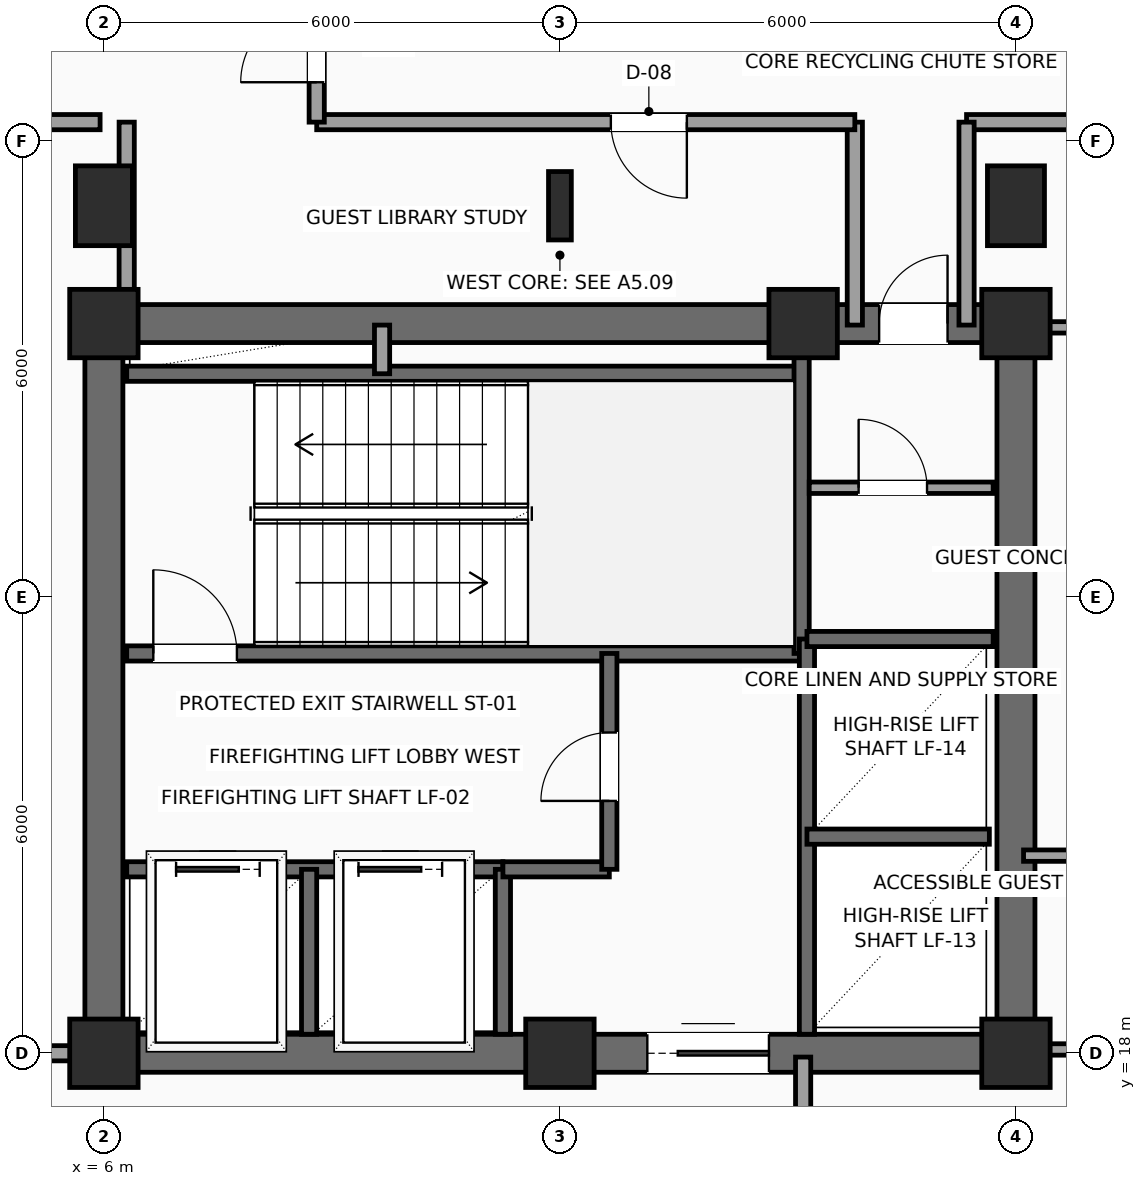
"""IFC4 building model, lengths in metres.
Left out: names, types, materials, properties, quantities, classifications, styles, units other than length and angle.
Written with IfcOpenShell. Run it as: python <this file> out.ifc"""

import sys

from ifc_helpers import new_model, si_unit, direction, frame, frame_2d, origin, origin_2d, place, context, subcontext, project, spatial, rectangle, i_section, extrude, element, fill, save


model = new_model("IFC4")
c1 = context("Model", 3, precision=1e-05, world=origin(), true_north=direction((0.0, 1.0)))
c2 = subcontext(c1, "Body", "Model", "MODEL_VIEW")
j1 = project(units=[si_unit("LENGTHUNIT", "METRE"), si_unit("PLANEANGLEUNIT", "RADIAN")], contexts=[c1])
p1 = place(None, origin())
s1 = spatial("IfcSite", under=j1, at=p1, CompositionType="ELEMENT")
p2 = place(p1, origin())
s2 = spatial("IfcBuilding", under=s1, at=p2, CompositionType="ELEMENT")
p3 = place(p2, frame((0.0, 0.0, 172.95)))
s3 = spatial("IfcBuildingStorey", under=s2, at=p3, CompositionType="ELEMENT", Elevation=172.95)
for number, where, z_axis, x_axis in (
    (1, (6.0, 18.0, 0.0), (0.0, 0.0, 1.0), (1.0, 0.0, 0.0)),
    (2, (12.0, 18.0, 0.0), (0.0, 0.0, 1.0), (1.0, 0.0, 0.0)),
    (3, (18.0, 18.0, 0.0), (0.0, 0.0, 1.0), (1.0, 0.0, 0.0)),
    (4, (6.0, 27.6, 0.0), (0.0, 0.0, 1.0), (1.0, 0.0, 0.0)),
    (5, (15.2, 27.6, 0.0), (0.0, 0.0, 1.0), (1.0, 0.0, 0.0)),
    (6, (18.0, 27.6, 0.0), (0.0, 0.0, 1.0), (1.0, 0.0, 0.0)),
):
    element("IfcColumn", number, at=place(p3, frame(where, z_axis=z_axis, x_axis=x_axis)), inside=s3, PredefinedType="COLUMN", context=c2, shape_type="SweptSolid", body=[
        extrude(rectangle(XDim=0.9, YDim=0.9, at=origin_2d()), origin(), (0.0, 0.0, 1.0), 3.75),
    ])
p4 = place(p3, frame((6.0, 29.15, 0.0), z_axis=(0.0, 0.0, 1.0), x_axis=(1.0, 0.0, 0.0)))
e7 = element("IfcColumn", 7, at=p4, inside=s3, PredefinedType="COLUMN", context=c2, shape_type="SweptSolid", body=[
    extrude(rectangle(XDim=0.75, YDim=1.05, at=origin_2d()), origin(), (0.0, 0.0, 1.0), 3.75),
])
p5 = place(p3, frame((12.0, 29.15, 0.0), z_axis=(0.0, 0.0, 1.0), x_axis=(1.0, 0.0, 0.0)))
e8 = element("IfcColumn", 8, at=p5, inside=s3, PredefinedType="COLUMN", context=c2, shape_type="SweptSolid", body=[
    extrude(i_section(OverallWidth=0.3, OverallDepth=0.9, WebThickness=0.019, FlangeThickness=0.035, FilletRadius=0.03, at=origin_2d()), origin(), (0.0, 0.0, 1.0), 3.75),
])
p6 = place(p3, frame((18.0, 29.15, 0.0), z_axis=(0.0, 0.0, 1.0), x_axis=(1.0, 0.0, 0.0)))
e9 = element("IfcColumn", 9, at=p6, inside=s3, PredefinedType="COLUMN", context=c2, shape_type="SweptSolid", body=[
    extrude(rectangle(XDim=0.75, YDim=1.05, at=origin_2d()), origin(), (0.0, 0.0, 1.0), 3.75),
])
p7 = place(p3, frame((6.0, 18.0, 0.0), z_axis=(0.0, 0.0, 1.0), x_axis=(1.0, 0.0, 0.0)))
e10 = element("IfcWall", 10, at=p7, inside=s3, PredefinedType="SHEAR", context=c2, shape_type="SweptSolid", body=[
    extrude(rectangle(XDim=12.0, YDim=0.5, at=frame_2d((6.0, 0.0))), origin(), (0.0, 0.0, 1.0), 3.54),
])
p8 = place(p7, frame((7.15, 0.0, 0.0)))
e11 = element("IfcOpeningElement", 11, at=p8, cuts=e10, PredefinedType="OPENING", context=c2, shape_type="SweptSolid", body=[
    extrude(rectangle(XDim=1.6, YDim=2.3, at=frame_2d((0.8, 1.15))), frame((0.0, 0.26, 0.0), z_axis=(0.0, -1.0, 0.0), x_axis=(1.0, 0.0, 0.0)), (0.0, 0.0, 1.0), 0.52),
])
p9 = place(p3, frame((6.0, 27.6, 0.0), z_axis=(0.0, 0.0, 1.0), x_axis=(1.0, 0.0, 0.0)))
e12 = element("IfcWall", 12, at=p9, inside=s3, PredefinedType="SHEAR", context=c2, shape_type="SweptSolid", body=[
    extrude(rectangle(XDim=12.0, YDim=0.5, at=frame_2d((6.0, 0.0))), origin(), (0.0, 0.0, 1.0), 3.54),
])
p10 = place(p9, frame((10.2, 0.0, 0.0)))
e13 = element("IfcOpeningElement", 13, at=p10, cuts=e12, PredefinedType="OPENING", context=c2, shape_type="SweptSolid", body=[
    extrude(rectangle(XDim=0.9, YDim=2.15, at=frame_2d((0.45, 1.075))), frame((0.0, 0.26, 0.0), z_axis=(0.0, -1.0, 0.0), x_axis=(1.0, 0.0, 0.0)), (0.0, 0.0, 1.0), 0.52),
])
for number, where, z_axis, x_axis in (
    (14, (6.0, 18.0, 0.0), (0.0, 0.0, 1.0), (0.0, 1.0, 0.0)),
    (15, (18.0, 18.0, 0.0), (0.0, 0.0, 1.0), (0.0, 1.0, 0.0)),
):
    element("IfcWall", number, at=place(p3, frame(where, z_axis=z_axis, x_axis=x_axis)), inside=s3, PredefinedType="SHEAR", context=c2, shape_type="SweptSolid", body=[
        extrude(rectangle(XDim=9.6, YDim=0.5, at=frame_2d((4.8, 0.0))), origin(), (0.0, 0.0, 1.0), 3.54),
    ])
p11 = place(p3, frame((6.3, 23.26, 0.0), z_axis=(0.0, 0.0, 1.0), x_axis=(1.0, 0.0, 0.0)))
e16 = element("IfcWall", 16, at=p11, inside=s3, PredefinedType="SHEAR", context=c2, shape_type="SweptSolid", body=[
    extrude(rectangle(XDim=8.88, YDim=0.2, at=frame_2d((4.44, 0.0))), origin(), (0.0, 0.0, 1.0), 3.54),
])
p12 = place(p11, frame((0.35, 0.0, 0.0)))
e17 = element("IfcOpeningElement", 17, at=p12, cuts=e16, PredefinedType="OPENING", context=c2, shape_type="SweptSolid", body=[
    extrude(rectangle(XDim=1.1, YDim=2.2, at=frame_2d((0.55, 1.1))), frame((0.0, 0.11, 0.0), z_axis=(0.0, -1.0, 0.0), x_axis=(1.0, 0.0, 0.0)), (0.0, 0.0, 1.0), 0.22),
])
p13 = place(p3, frame((6.3, 26.94, 0.0), z_axis=(0.0, 0.0, 1.0), x_axis=(1.0, 0.0, 0.0)))
e18 = element("IfcWall", 18, at=p13, inside=s3, PredefinedType="SHEAR", context=c2, shape_type="SweptSolid", body=[
    extrude(rectangle(XDim=8.88, YDim=0.2, at=frame_2d((4.44, 0.0))), origin(), (0.0, 0.0, 1.0), 3.54),
])
p14 = place(p3, frame((15.18, 23.26, 0.0), z_axis=(0.0, 0.0, 1.0), x_axis=(0.0, 1.0, 0.0)))
e19 = element("IfcWall", 19, at=p14, inside=s3, PredefinedType="SHEAR", context=c2, shape_type="SweptSolid", body=[
    extrude(rectangle(XDim=4.04, YDim=0.2, at=frame_2d((2.02, 0.0))), origin(), (0.0, 0.0, 1.0), 3.54),
])
p15 = place(p3, frame((6.3, 20.42, 0.0), z_axis=(0.0, 0.0, 1.0), x_axis=(1.0, 0.0, 0.0)))
e20 = element("IfcWall", 20, at=p15, inside=s3, PredefinedType="SHEAR", context=c2, shape_type="SweptSolid", body=[
    extrude(rectangle(XDim=4.95, YDim=0.2, at=frame_2d((2.475, 0.0))), origin(), (0.0, 0.0, 1.0), 3.54),
])
p16 = place(p15, frame((0.65, 0.0, 0.0)))
e21 = element("IfcOpeningElement", 21, at=p16, cuts=e20, PredefinedType="OPENING", context=c2, shape_type="SweptSolid", body=[
    extrude(rectangle(XDim=1.1, YDim=2.2, at=frame_2d((0.55, 1.1))), frame((0.0, 0.11, 0.0), z_axis=(0.0, -1.0, 0.0), x_axis=(1.0, 0.0, 0.0)), (0.0, 0.0, 1.0), 0.22),
])
p17 = place(p15, frame((3.05, 0.0, 0.0)))
e22 = element("IfcOpeningElement", 22, at=p17, cuts=e20, PredefinedType="OPENING", context=c2, shape_type="SweptSolid", body=[
    extrude(rectangle(XDim=1.1, YDim=2.2, at=frame_2d((0.55, 1.1))), frame((0.0, 0.11, 0.0), z_axis=(0.0, -1.0, 0.0), x_axis=(1.0, 0.0, 0.0)), (0.0, 0.0, 1.0), 0.22),
])
for number, where, z_axis, x_axis in (
    (23, (8.7, 18.25, 0.0), (0.0, 0.0, 1.0), (0.0, 1.0, 0.0)),
    (24, (11.25, 18.25, 0.0), (0.0, 0.0, 1.0), (0.0, 1.0, 0.0)),
):
    element("IfcWall", number, at=place(p3, frame(where, z_axis=z_axis, x_axis=x_axis)), inside=s3, PredefinedType="SHEAR", context=c2, shape_type="SweptSolid", body=[
        extrude(rectangle(XDim=2.17, YDim=0.2, at=frame_2d((1.085, 0.0))), origin(), (0.0, 0.0, 1.0), 3.54),
    ])
p18 = place(p3, frame((11.25, 20.42, 0.0), z_axis=(0.0, 0.0, 1.0), x_axis=(1.0, 0.0, 0.0)))
e25 = element("IfcWall", 25, at=p18, inside=s3, PredefinedType="SHEAR", context=c2, shape_type="SweptSolid", body=[
    extrude(rectangle(XDim=1.4, YDim=0.2, at=frame_2d((0.7, 0.0))), origin(), (0.0, 0.0, 1.0), 3.54),
])
p19 = place(p3, frame((12.65, 20.42, 0.0), z_axis=(0.0, 0.0, 1.0), x_axis=(0.0, 1.0, 0.0)))
e26 = element("IfcWall", 26, at=p19, inside=s3, PredefinedType="SHEAR", context=c2, shape_type="SweptSolid", body=[
    extrude(rectangle(XDim=2.84, YDim=0.2, at=frame_2d((1.42, 0.0))), origin(), (0.0, 0.0, 1.0), 3.54),
])
p20 = place(p19, frame((0.9, 0.0, 0.0)))
e27 = element("IfcOpeningElement", 27, at=p20, cuts=e26, PredefinedType="OPENING", context=c2, shape_type="SweptSolid", body=[
    extrude(rectangle(XDim=0.9, YDim=2.15, at=frame_2d((0.45, 1.075))), frame((0.0, 0.11, 0.0), z_axis=(0.0, -1.0, 0.0), x_axis=(1.0, 0.0, 0.0)), (0.0, 0.0, 1.0), 0.22),
])
p21 = place(p3, frame((9.66, 26.94, 0.0), z_axis=(0.0, 0.0, 1.0), x_axis=(0.0, 1.0, 0.0)))
e28 = element("IfcWall", 28, at=p21, inside=s3, PredefinedType="SOLIDWALL", context=c2, shape_type="SweptSolid", body=[
    extrude(rectangle(XDim=0.64, YDim=0.2, at=frame_2d((0.32, 0.0))), origin(), (0.0, 0.0, 1.0), 3.54),
])
p22 = place(p3, frame((15.25, 18.25, 0.0), z_axis=(0.0, 0.0, 1.0), x_axis=(0.0, 1.0, 0.0)))
e29 = element("IfcWall", 29, at=p22, inside=s3, PredefinedType="SHEAR", context=c2, shape_type="SweptSolid", body=[
    extrude(rectangle(XDim=5.2, YDim=0.2, at=frame_2d((2.6, 0.0))), origin(), (0.0, 0.0, 1.0), 3.54),
])
p23 = place(p3, frame((15.25, 20.85, 0.0), z_axis=(0.0, 0.0, 1.0), x_axis=(1.0, 0.0, 0.0)))
e30 = element("IfcWall", 30, at=p23, inside=s3, PredefinedType="SHEAR", context=c2, shape_type="SweptSolid", body=[
    extrude(rectangle(XDim=2.4, YDim=0.2, at=frame_2d((1.2, 0.0))), origin(), (0.0, 0.0, 1.0), 3.54),
])
p24 = place(p3, frame((15.25, 23.45, 0.0), z_axis=(0.0, 0.0, 1.0), x_axis=(1.0, 0.0, 0.0)))
e31 = element("IfcWall", 31, at=p24, inside=s3, PredefinedType="SHEAR", context=c2, shape_type="SweptSolid", body=[
    extrude(rectangle(XDim=2.45, YDim=0.2, at=frame_2d((1.225, 0.0))), origin(), (0.0, 0.0, 1.0), 3.54),
])
p25 = place(p3, frame((15.28, 25.44, 0.0), z_axis=(0.0, 0.0, 1.0), x_axis=(1.0, 0.0, 0.0)))
e32 = element("IfcWall", 32, at=p25, inside=s3, PredefinedType="PARTITIONING", context=c2, shape_type="SweptSolid", body=[
    extrude(rectangle(XDim=2.42, YDim=0.15, at=frame_2d((1.21, 0.0))), origin(), (0.0, 0.0, 1.0), 3.54),
])
p26 = place(p25, frame((0.65, 0.0, 0.0)))
e33 = element("IfcOpeningElement", 33, at=p26, cuts=e32, PredefinedType="OPENING", context=c2, shape_type="SweptSolid", body=[
    extrude(rectangle(XDim=0.9, YDim=2.15, at=frame_2d((0.45, 1.075))), frame((0.0, 0.085, 0.0), z_axis=(0.0, -1.0, 0.0), x_axis=(1.0, 0.0, 0.0)), (0.0, 0.0, 1.0), 0.17),
])
p27 = place(p3, frame((15.2, 17.95, 0.0), z_axis=(0.0, 0.0, 1.0), x_axis=(0.0, -1.0, 0.0)))
e34 = element("IfcWall", 34, at=p27, inside=s3, PredefinedType="PARTITIONING", context=c2, shape_type="SweptSolid", body=[
    extrude(rectangle(XDim=1.7, YDim=0.2, at=frame_2d((0.85, 0.0))), origin(), (0.0, 0.0, 1.0), 3.54),
])
p28 = place(p3, frame((22.25, 30.25, 0.0), z_axis=(0.0, 0.0, 1.0), x_axis=(-1.0, 0.0, 0.0)))
e35 = element("IfcWall", 35, at=p28, inside=s3, PredefinedType="PARTITIONING", context=c2, shape_type="SweptSolid", body=[
    extrude(rectangle(XDim=4.9, YDim=0.2, at=frame_2d((2.45, 0.0))), origin(), (0.0, 0.0, 1.0), 3.54),
])
p29 = place(p28, frame((1.95, 0.0, 0.0)))
e36 = element("IfcOpeningElement", 36, at=p29, cuts=e35, PredefinedType="OPENING", context=c2, shape_type="SweptSolid", body=[
    extrude(rectangle(XDim=1.0, YDim=2.2, at=frame_2d((0.5, 1.1))), frame((0.0, 0.11, 0.0), z_axis=(0.0, -1.0, 0.0), x_axis=(1.0, 0.0, 0.0)), (0.0, 0.0, 1.0), 0.22),
])
for number, where, z_axis, x_axis in (
    (37, (17.35, 30.25, 0.0), (0.0, 0.0, 1.0), (0.0, -1.0, 0.0)),
    (38, (15.88, 27.58, 0.0), (0.0, 0.0, 1.0), (0.0, 1.0, 0.0)),
):
    element("IfcWall", number, at=place(p3, frame(where, z_axis=z_axis, x_axis=x_axis)), inside=s3, PredefinedType="PARTITIONING", context=c2, shape_type="SweptSolid", body=[
        extrude(rectangle(XDim=2.67, YDim=0.2, at=frame_2d((1.335, 0.0))), origin(), (0.0, 0.0, 1.0), 3.54),
    ])
p30 = place(p3, frame((15.88, 30.25, 0.0), z_axis=(0.0, 0.0, 1.0), x_axis=(-1.0, 0.0, 0.0)))
e39 = element("IfcWall", 39, at=p30, inside=s3, PredefinedType="PARTITIONING", context=c2, shape_type="SweptSolid", body=[
    extrude(rectangle(XDim=7.08, YDim=0.2, at=frame_2d((3.54, 0.0))), origin(), (0.0, 0.0, 1.0), 3.54),
])
p31 = place(p30, frame((2.21, 0.0, 0.0)))
e40 = element("IfcOpeningElement", 40, at=p31, cuts=e39, PredefinedType="OPENING", context=c2, shape_type="SweptSolid", body=[
    extrude(rectangle(XDim=1.0, YDim=2.2, at=frame_2d((0.5, 1.1))), frame((0.0, 0.11, 0.0), z_axis=(0.0, -1.0, 0.0), x_axis=(1.0, 0.0, 0.0)), (0.0, 0.0, 1.0), 0.22),
])
p32 = place(p3, frame((8.8, 30.25, 0.0), z_axis=(0.0, 0.0, 1.0), x_axis=(0.0, 1.0, 0.0)))
e41 = element("IfcWall", 41, at=p32, inside=s3, PredefinedType="PARTITIONING", context=c2, shape_type="SweptSolid", body=[
    extrude(rectangle(XDim=2.05, YDim=0.2, at=frame_2d((1.025, 0.0))), origin(), (0.0, 0.0, 1.0), 3.54),
])
p33 = place(p32, frame((0.525, 0.0, 0.0)))
e42 = element("IfcOpeningElement", 42, at=p33, cuts=e41, PredefinedType="OPENING", context=c2, shape_type="SweptSolid", body=[
    extrude(rectangle(XDim=1.0, YDim=2.2, at=frame_2d((0.5, 1.1))), frame((0.0, 0.11, 0.0), z_axis=(0.0, -1.0, 0.0), x_axis=(1.0, 0.0, 0.0)), (0.0, 0.0, 1.0), 0.22),
])
p34 = place(p3, frame((18.1, 18.05, 0.0), z_axis=(0.0, 0.0, 1.0), x_axis=(1.0, 0.0, 0.0)))
e43 = element("IfcWall", 43, at=p34, inside=s3, PredefinedType="PARTITIONING", context=c2, shape_type="SweptSolid", body=[
    extrude(rectangle(XDim=3.25, YDim=0.15, at=frame_2d((1.625, 0.0))), origin(), (0.0, 0.0, 1.0), 3.132),
])
for number, where, z_axis, x_axis in (
    (44, (18.1, 20.6, 0.0), (0.0, 0.0, 1.0), (1.0, 0.0, 0.0)),
    (45, (18.1, 24.5, 0.0), (0.0, 0.0, 1.0), (1.0, 0.0, 0.0)),
    (46, (18.1, 27.55, 0.0), (0.0, 0.0, 1.0), (1.0, 0.0, 0.0)),
):
    element("IfcWall", number, at=place(p3, frame(where, z_axis=z_axis, x_axis=x_axis)), inside=s3, PredefinedType="PARTITIONING", context=c2, shape_type="SweptSolid", body=[
        extrude(rectangle(XDim=3.25, YDim=0.15, at=frame_2d((1.625, 0.0))), origin(), (0.0, 0.0, 1.0), 3.54),
    ])
p35 = place(p3, frame((0.3, 18.0, 0.0), z_axis=(0.0, 0.0, 1.0), x_axis=(1.0, 0.0, 0.0)))
e47 = element("IfcWall", 47, at=p35, inside=s3, PredefinedType="PARTITIONING", context=c2, shape_type="SweptSolid", body=[
    extrude(rectangle(XDim=5.65, YDim=0.2, at=frame_2d((2.825, 0.0))), origin(), (0.0, 0.0, 1.0), 3.132),
])
p36 = place(p35, frame((2.35, 0.0, 0.0)))
e48 = element("IfcOpeningElement", 48, at=p36, cuts=e47, PredefinedType="OPENING", context=c2, shape_type="SweptSolid", body=[
    extrude(rectangle(XDim=1.0, YDim=2.2, at=frame_2d((0.5, 1.1))), frame((0.0, 0.11, 0.0), z_axis=(0.0, -1.0, 0.0), x_axis=(1.0, 0.0, 0.0)), (0.0, 0.0, 1.0), 0.22),
])
p37 = place(p3, frame((0.3, 30.25, 0.0), z_axis=(0.0, 0.0, 1.0), x_axis=(1.0, 0.0, 0.0)))
e49 = element("IfcWall", 49, at=p37, inside=s3, PredefinedType="PARTITIONING", context=c2, shape_type="SweptSolid", body=[
    extrude(rectangle(XDim=5.65, YDim=0.2, at=frame_2d((2.825, 0.0))), origin(), (0.0, 0.0, 1.0), 3.54),
])
p38 = place(p3, frame((6.3, 27.65, 0.0), z_axis=(0.0, 0.0, 1.0), x_axis=(0.0, 1.0, 0.0)))
e50 = element("IfcWall", 50, at=p38, inside=s3, PredefinedType="PARTITIONING", context=c2, shape_type="SweptSolid", body=[
    extrude(rectangle(XDim=2.6, YDim=0.2, at=frame_2d((1.3, 0.0))), origin(), (0.0, 0.0, 1.0), 3.132),
])
p39 = place(p8, origin())
e51 = element("IfcDoor", 51, at=p39, inside=s3, OperationType="DOUBLE_DOOR_SLIDING", PredefinedType="DOOR", context=c2, shape_type="SweptSolid", body=[
    extrude(rectangle(XDim=1.6, YDim=2.3, at=frame_2d((0.8, 1.15))), frame((0.0, 0.025, 0.0), z_axis=(0.0, -1.0, 0.0), x_axis=(1.0, 0.0, 0.0)), (0.0, 0.0, 1.0), 0.05),
])
fill(e11, e51)
p40 = place(p10, origin())
e52 = element("IfcDoor", 52, at=p40, inside=s3, OperationType="SINGLE_SWING_RIGHT", PredefinedType="DOOR", context=c2, shape_type="SweptSolid", body=[
    extrude(rectangle(XDim=0.9, YDim=2.15, at=frame_2d((0.45, 1.075))), frame((0.0, 0.025, 0.0), z_axis=(0.0, -1.0, 0.0), x_axis=(1.0, 0.0, 0.0)), (0.0, 0.0, 1.0), 0.05),
])
fill(e13, e52)
p41 = place(p12, origin())
e53 = element("IfcDoor", 53, at=p41, inside=s3, OperationType="SINGLE_SWING_LEFT", PredefinedType="DOOR", context=c2, shape_type="SweptSolid", body=[
    extrude(rectangle(XDim=1.1, YDim=2.2, at=frame_2d((0.55, 1.1))), frame((0.0, 0.025, 0.0), z_axis=(0.0, -1.0, 0.0), x_axis=(1.0, 0.0, 0.0)), (0.0, 0.0, 1.0), 0.05),
])
fill(e17, e53)
p42 = place(p16, origin())
e54 = element("IfcDoor", 54, at=p42, inside=s3, OperationType="SLIDING_TO_LEFT", PredefinedType="DOOR", context=c2, shape_type="SweptSolid", body=[
    extrude(rectangle(XDim=1.1, YDim=2.2, at=frame_2d((0.55, 1.1))), frame((0.0, 0.025, 0.0), z_axis=(0.0, -1.0, 0.0), x_axis=(1.0, 0.0, 0.0)), (0.0, 0.0, 1.0), 0.05),
])
fill(e21, e54)
p43 = place(p17, origin())
e55 = element("IfcDoor", 55, at=p43, inside=s3, OperationType="SLIDING_TO_LEFT", PredefinedType="DOOR", context=c2, shape_type="SweptSolid", body=[
    extrude(rectangle(XDim=1.1, YDim=2.2, at=frame_2d((0.55, 1.1))), frame((0.0, 0.025, 0.0), z_axis=(0.0, -1.0, 0.0), x_axis=(1.0, 0.0, 0.0)), (0.0, 0.0, 1.0), 0.05),
])
fill(e22, e55)
p44 = place(p20, origin())
e56 = element("IfcDoor", 56, at=p44, inside=s3, OperationType="SINGLE_SWING_LEFT", PredefinedType="DOOR", context=c2, shape_type="SweptSolid", body=[
    extrude(rectangle(XDim=0.9, YDim=2.15, at=frame_2d((0.45, 1.075))), frame((0.0, 0.025, 0.0), z_axis=(0.0, -1.0, 0.0), x_axis=(1.0, 0.0, 0.0)), (0.0, 0.0, 1.0), 0.05),
])
fill(e27, e56)
p45 = place(p26, origin())
e57 = element("IfcDoor", 57, at=p45, inside=s3, OperationType="SINGLE_SWING_LEFT", PredefinedType="DOOR", context=c2, shape_type="SweptSolid", body=[
    extrude(rectangle(XDim=0.9, YDim=2.15, at=frame_2d((0.45, 1.075))), frame((0.0, 0.025, 0.0), z_axis=(0.0, -1.0, 0.0), x_axis=(1.0, 0.0, 0.0)), (0.0, 0.0, 1.0), 0.05),
])
fill(e33, e57)
p46 = place(p31, origin())
e58 = element("IfcDoor", 58, at=p46, inside=s3, OperationType="SINGLE_SWING_LEFT", PredefinedType="DOOR", context=c2, shape_type="SweptSolid", body=[
    extrude(rectangle(XDim=1.0, YDim=2.2, at=frame_2d((0.5, 1.1))), frame((0.0, 0.025, 0.0), z_axis=(0.0, -1.0, 0.0), x_axis=(1.0, 0.0, 0.0)), (0.0, 0.0, 1.0), 0.05),
])
fill(e40, e58)
p47 = place(p33, origin())
e59 = element("IfcDoor", 59, at=p47, inside=s3, OperationType="SINGLE_SWING_LEFT", PredefinedType="DOOR", context=c2, shape_type="SweptSolid", body=[
    extrude(rectangle(XDim=1.0, YDim=2.2, at=frame_2d((0.5, 1.1))), frame((0.0, 0.025, 0.0), z_axis=(0.0, -1.0, 0.0), x_axis=(1.0, 0.0, 0.0)), (0.0, 0.0, 1.0), 0.05),
])
fill(e42, e59)
save(model, sys.argv[1])
